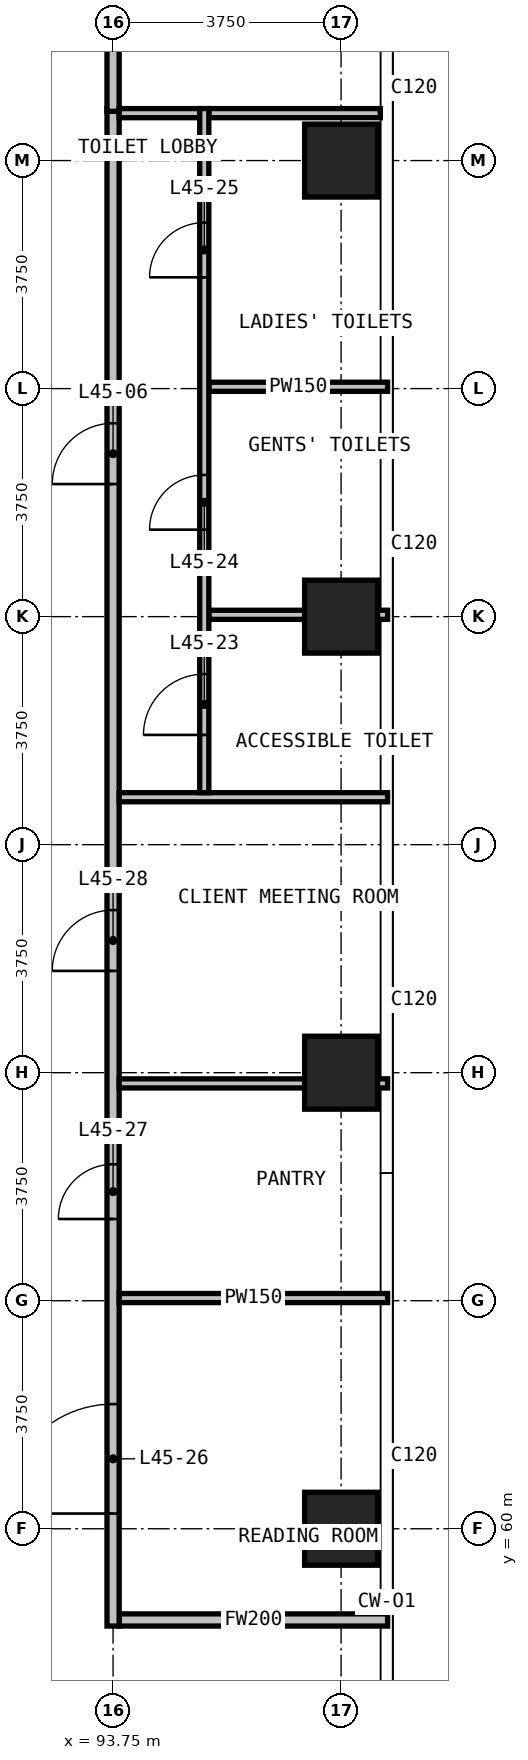
"""IFC4 building model, lengths in metres.
Left out: names, types, materials, properties, quantities, classifications, styles, units other than length and angle.
Written with IfcOpenShell. Run it as: python <this file> out.ifc"""

import sys

from ifc_helpers import new_model, si_unit, direction, frame, frame_2d, origin, origin_2d, place, context, subcontext, project, spatial, rectangle, extrude, element, fill, save


model = new_model("IFC4")
c1 = context("Model", 3, precision=1e-05, world=origin(), true_north=direction((0.0, 1.0)))
c2 = subcontext(c1, "Body", "Model", "MODEL_VIEW")
j1 = project(units=[si_unit("LENGTHUNIT", "METRE"), si_unit("PLANEANGLEUNIT", "RADIAN")], contexts=[c1])
p1 = place(None, origin())
s1 = spatial("IfcSite", under=j1, at=p1, CompositionType="ELEMENT")
p2 = place(p1, origin())
s2 = spatial("IfcBuilding", under=s1, at=p2, CompositionType="ELEMENT")
p3 = place(p2, frame((0.0, 0.0, 176.5)))
s3 = spatial("IfcBuildingStorey", under=s2, at=p3, CompositionType="ELEMENT", Elevation=176.5)
for number, where, z_axis, x_axis in (
    (1, (97.5, 60.0, 0.0), (0.0, 0.0, 1.0), (1.0, 0.0, 0.0)),
    (2, (97.5, 67.5, 0.0), (0.0, 0.0, 1.0), (1.0, 0.0, 0.0)),
    (3, (97.5, 75.0, 0.0), (0.0, 0.0, 1.0), (1.0, 0.0, 0.0)),
    (4, (97.5, 82.5, 0.0), (0.0, 0.0, 1.0), (1.0, 0.0, 0.0)),
):
    element("IfcColumn", number, at=place(p3, frame(where, z_axis=z_axis, x_axis=x_axis)), inside=s3, PredefinedType="COLUMN", context=c2, shape_type="SweptSolid", body=[
        extrude(rectangle(XDim=1.2, YDim=1.2, at=origin_2d()), origin(), (0.0, 0.0, 1.0), 3.6),
    ])
p4 = place(p3, frame((93.85, 58.5, 0.0), z_axis=(0.0, 0.0, 1.0), x_axis=(1.0, 0.0, 0.0)))
e5 = element("IfcWall", 5, at=p4, inside=s3, PredefinedType="PARTITIONING", context=c2, shape_type="SweptSolid", body=[
    extrude(rectangle(XDim=4.415, YDim=0.2, at=frame_2d((2.208, 0.0))), origin(), (0.0, 0.0, 1.0), 3.3),
])
p5 = place(p3, frame((93.75, 58.4, 0.0), z_axis=(0.0, 0.0, 1.0), x_axis=(0.0, 1.0, 0.0)))
e6 = element("IfcWall", 6, at=p5, inside=s3, PredefinedType="PARTITIONING", context=c2, shape_type="SweptSolid", body=[
    extrude(rectangle(XDim=24.955, YDim=0.2, at=frame_2d((12.478, 0.0))), origin(), (0.0, 0.0, 1.0), 3.3),
])
p6 = place(p5, frame((18.78, 0.0, 0.0)))
e7 = element("IfcOpeningElement", 7, at=p6, cuts=e6, PredefinedType="OPENING", context=c2, shape_type="SweptSolid", body=[
    extrude(rectangle(XDim=1.0, YDim=2.2, at=frame_2d((0.5, 1.1))), frame((0.0, 0.11, 0.0), z_axis=(0.0, -1.0, 0.0), x_axis=(1.0, 0.0, 0.0)), (0.0, 0.0, 1.0), 0.22),
])
p7 = place(p5, frame((1.85, 0.0, 0.0)))
e8 = element("IfcOpeningElement", 8, at=p7, cuts=e6, PredefinedType="OPENING", context=c2, shape_type="SweptSolid", body=[
    extrude(rectangle(XDim=1.8, YDim=2.2, at=frame_2d((0.9, 1.1))), frame((0.0, 0.11, 0.0), z_axis=(0.0, -1.0, 0.0), x_axis=(1.0, 0.0, 0.0)), (0.0, 0.0, 1.0), 0.22),
])
p8 = place(p5, frame((6.694, 0.0, 0.0)))
e9 = element("IfcOpeningElement", 9, at=p8, cuts=e6, PredefinedType="OPENING", context=c2, shape_type="SweptSolid", body=[
    extrude(rectangle(XDim=0.9, YDim=2.2, at=frame_2d((0.45, 1.1))), frame((0.0, 0.11, 0.0), z_axis=(0.0, -1.0, 0.0), x_axis=(1.0, 0.0, 0.0)), (0.0, 0.0, 1.0), 0.22),
])
p9 = place(p5, frame((10.774, 0.0, 0.0)))
e10 = element("IfcOpeningElement", 10, at=p9, cuts=e6, PredefinedType="OPENING", context=c2, shape_type="SweptSolid", body=[
    extrude(rectangle(XDim=1.0, YDim=2.2, at=frame_2d((0.5, 1.1))), frame((0.0, 0.11, 0.0), z_axis=(0.0, -1.0, 0.0), x_axis=(1.0, 0.0, 0.0)), (0.0, 0.0, 1.0), 0.22),
])
p10 = place(p3, frame((93.75, 83.31, 0.0), z_axis=(0.0, 0.0, 1.0), x_axis=(0.0, 1.0, 0.0)))
e11 = element("IfcWall", 11, at=p10, inside=s3, PredefinedType="PARTITIONING", context=c2, shape_type="SweptSolid", body=[
    extrude(rectangle(XDim=7.335, YDim=0.2, at=frame_2d((3.667, 0.0))), origin(), (0.0, 0.0, 1.0), 3.3),
])
for number, where, z_axis, x_axis in (
    (12, (93.85, 63.794, 0.0), (0.0, 0.0, 1.0), (1.0, 0.0, 0.0)),
    (13, (93.85, 67.324, 0.0), (0.0, 0.0, 1.0), (1.0, 0.0, 0.0)),
    (14, (93.85, 72.03, 0.0), (0.0, 0.0, 1.0), (1.0, 0.0, 0.0)),
):
    element("IfcWall", number, at=place(p3, frame(where, z_axis=z_axis, x_axis=x_axis)), inside=s3, PredefinedType="PARTITIONING", context=c2, shape_type="SweptSolid", body=[
        extrude(rectangle(XDim=4.415, YDim=0.15, at=frame_2d((2.208, 0.0))), origin(), (0.0, 0.0, 1.0), 3.3),
    ])
for number, where, z_axis, x_axis in (
    (15, (95.325, 75.03, 0.0), (0.0, 0.0, 1.0), (1.0, 0.0, 0.0)),
    (16, (95.325, 78.78, 0.0), (0.0, 0.0, 1.0), (1.0, 0.0, 0.0)),
):
    element("IfcWall", number, at=place(p3, frame(where, z_axis=z_axis, x_axis=x_axis)), inside=s3, PredefinedType="PARTITIONING", context=c2, shape_type="SweptSolid", body=[
        extrude(rectangle(XDim=2.94, YDim=0.15, at=frame_2d((1.47, 0.0))), origin(), (0.0, 0.0, 1.0), 3.3),
    ])
p11 = place(p3, frame((93.85, 83.28, 0.0), z_axis=(0.0, 0.0, 1.0), x_axis=(1.0, 0.0, 0.0)))
e17 = element("IfcWall", 17, at=p11, inside=s3, PredefinedType="PARTITIONING", context=c2, shape_type="SweptSolid", body=[
    extrude(rectangle(XDim=1.325, YDim=0.15, at=frame_2d((0.663, 0.0))), origin(), (0.0, 0.0, 1.0), 3.3),
])
p12 = place(p3, frame((95.325, 83.28, 0.0), z_axis=(0.0, 0.0, 1.0), x_axis=(1.0, 0.0, 0.0)))
e18 = element("IfcWall", 18, at=p12, inside=s3, PredefinedType="PARTITIONING", context=c2, shape_type="SweptSolid", body=[
    extrude(rectangle(XDim=2.82, YDim=0.15, at=frame_2d((1.41, 0.0))), origin(), (0.0, 0.0, 1.0), 3.3),
])
p13 = place(p3, frame((95.25, 72.105, 0.0), z_axis=(0.0, 0.0, 1.0), x_axis=(0.0, 1.0, 0.0)))
e19 = element("IfcWall", 19, at=p13, inside=s3, PredefinedType="PARTITIONING", context=c2, shape_type="SweptSolid", body=[
    extrude(rectangle(XDim=11.25, YDim=0.15, at=frame_2d((5.625, 0.0))), origin(), (0.0, 0.0, 1.0), 3.3),
])
p14 = place(p13, frame((0.95, 0.0, 0.0)))
e20 = element("IfcOpeningElement", 20, at=p14, cuts=e19, PredefinedType="OPENING", context=c2, shape_type="SweptSolid", body=[
    extrude(rectangle(XDim=1.0, YDim=2.2, at=frame_2d((0.5, 1.1))), frame((0.0, 0.085, 0.0), z_axis=(0.0, -1.0, 0.0), x_axis=(1.0, 0.0, 0.0)), (0.0, 0.0, 1.0), 0.17),
])
p15 = place(p13, frame((4.325, 0.0, 0.0)))
e21 = element("IfcOpeningElement", 21, at=p15, cuts=e19, PredefinedType="OPENING", context=c2, shape_type="SweptSolid", body=[
    extrude(rectangle(XDim=0.9, YDim=2.2, at=frame_2d((0.45, 1.1))), frame((0.0, 0.085, 0.0), z_axis=(0.0, -1.0, 0.0), x_axis=(1.0, 0.0, 0.0)), (0.0, 0.0, 1.0), 0.17),
])
p16 = place(p13, frame((8.475, 0.0, 0.0)))
e22 = element("IfcOpeningElement", 22, at=p16, cuts=e19, PredefinedType="OPENING", context=c2, shape_type="SweptSolid", body=[
    extrude(rectangle(XDim=0.9, YDim=2.2, at=frame_2d((0.45, 1.1))), frame((0.0, 0.085, 0.0), z_axis=(0.0, -1.0, 0.0), x_axis=(1.0, 0.0, 0.0)), (0.0, 0.0, 1.0), 0.17),
])
p17 = place(p6, origin())
e23 = element("IfcDoor", 23, at=p17, inside=s3, OperationType="SINGLE_SWING_LEFT", PredefinedType="DOOR", context=c2, shape_type="SweptSolid", body=[
    extrude(rectangle(XDim=1.0, YDim=2.2, at=frame_2d((0.5, 1.1))), frame((0.0, 0.025, 0.0), z_axis=(0.0, -1.0, 0.0), x_axis=(1.0, 0.0, 0.0)), (0.0, 0.0, 1.0), 0.05),
])
fill(e7, e23)
p18 = place(p14, origin())
e24 = element("IfcDoor", 24, at=p18, inside=s3, OperationType="SINGLE_SWING_LEFT", PredefinedType="DOOR", context=c2, shape_type="SweptSolid", body=[
    extrude(rectangle(XDim=1.0, YDim=2.2, at=frame_2d((0.5, 1.1))), frame((0.0, 0.025, 0.0), z_axis=(0.0, -1.0, 0.0), x_axis=(1.0, 0.0, 0.0)), (0.0, 0.0, 1.0), 0.05),
])
fill(e20, e24)
p19 = place(p15, origin())
e25 = element("IfcDoor", 25, at=p19, inside=s3, OperationType="SINGLE_SWING_LEFT", PredefinedType="DOOR", context=c2, shape_type="SweptSolid", body=[
    extrude(rectangle(XDim=0.9, YDim=2.2, at=frame_2d((0.45, 1.1))), frame((0.0, 0.025, 0.0), z_axis=(0.0, -1.0, 0.0), x_axis=(1.0, 0.0, 0.0)), (0.0, 0.0, 1.0), 0.05),
])
fill(e21, e25)
p20 = place(p16, origin())
e26 = element("IfcDoor", 26, at=p20, inside=s3, OperationType="SINGLE_SWING_LEFT", PredefinedType="DOOR", context=c2, shape_type="SweptSolid", body=[
    extrude(rectangle(XDim=0.9, YDim=2.2, at=frame_2d((0.45, 1.1))), frame((0.0, 0.025, 0.0), z_axis=(0.0, -1.0, 0.0), x_axis=(1.0, 0.0, 0.0)), (0.0, 0.0, 1.0), 0.05),
])
fill(e22, e26)
p21 = place(p7, origin())
e27 = element("IfcDoor", 27, at=p21, inside=s3, OperationType="DOUBLE_DOOR_SINGLE_SWING", PredefinedType="DOOR", context=c2, shape_type="SweptSolid", body=[
    extrude(rectangle(XDim=1.8, YDim=2.2, at=frame_2d((0.9, 1.1))), frame((0.0, 0.025, 0.0), z_axis=(0.0, -1.0, 0.0), x_axis=(1.0, 0.0, 0.0)), (0.0, 0.0, 1.0), 0.05),
])
fill(e8, e27)
p22 = place(p8, origin())
e28 = element("IfcDoor", 28, at=p22, inside=s3, OperationType="SINGLE_SWING_LEFT", PredefinedType="DOOR", context=c2, shape_type="SweptSolid", body=[
    extrude(rectangle(XDim=0.9, YDim=2.2, at=frame_2d((0.45, 1.1))), frame((0.0, 0.025, 0.0), z_axis=(0.0, -1.0, 0.0), x_axis=(1.0, 0.0, 0.0)), (0.0, 0.0, 1.0), 0.05),
])
fill(e9, e28)
p23 = place(p9, origin())
e29 = element("IfcDoor", 29, at=p23, inside=s3, OperationType="SINGLE_SWING_RIGHT", PredefinedType="DOOR", context=c2, shape_type="SweptSolid", body=[
    extrude(rectangle(XDim=1.0, YDim=2.2, at=frame_2d((0.5, 1.1))), frame((0.0, 0.025, 0.0), z_axis=(0.0, -1.0, 0.0), x_axis=(1.0, 0.0, 0.0)), (0.0, 0.0, 1.0), 0.05),
])
fill(e10, e29)
save(model, sys.argv[1])
